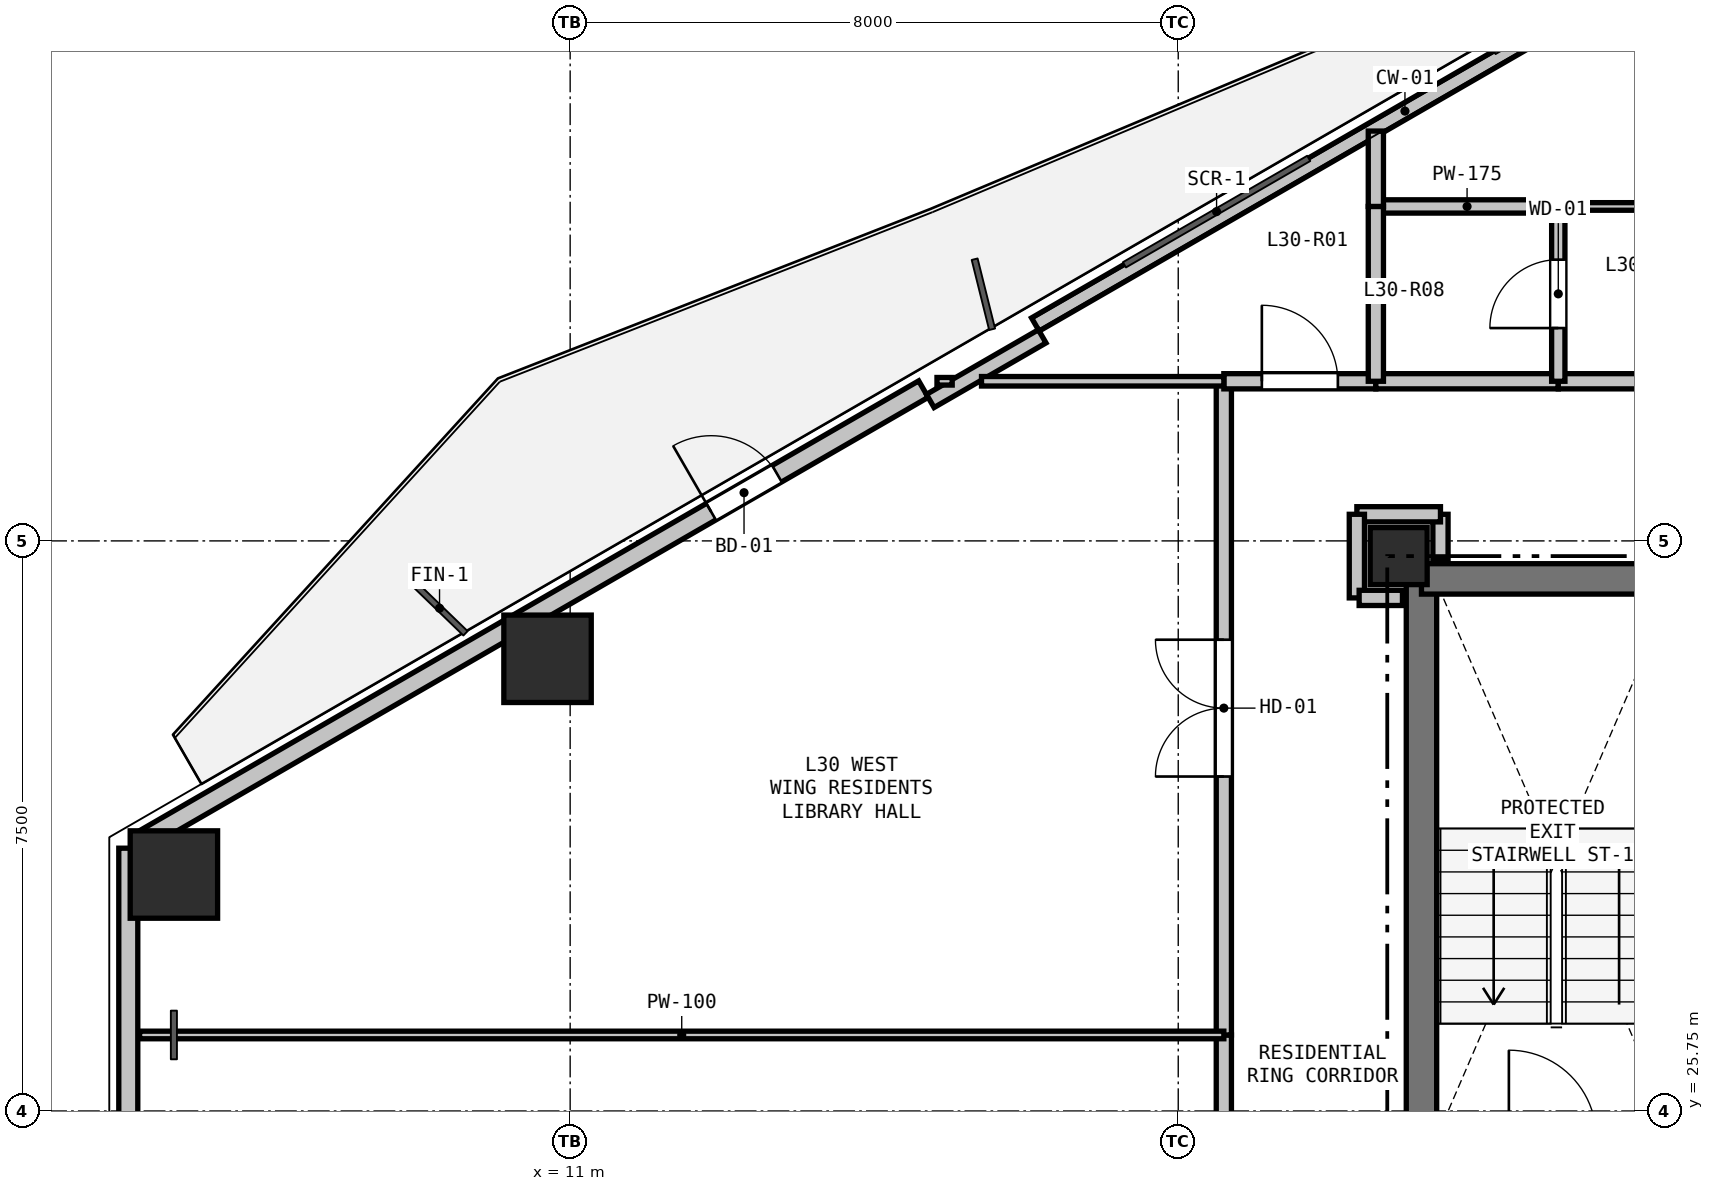
"""IFC4 building model, lengths in metres.
Left out: names, types, materials, properties, quantities, classifications, styles, units other than length and angle.
Written with IfcOpenShell. Run it as: python <this file> out.ifc"""

import sys

from ifc_helpers import new_model, si_unit, direction, frame, frame_2d, origin, origin_2d, place, context, subcontext, project, spatial, rectangle, hollow_rectangle, extrude, element, fill, save


model = new_model("IFC4")
c1 = context("Model", 3, precision=1e-05, world=origin(), true_north=direction((0.0, 1.0)))
c2 = subcontext(c1, "Body", "Model", "MODEL_VIEW")
j1 = project(units=[si_unit("LENGTHUNIT", "METRE"), si_unit("PLANEANGLEUNIT", "RADIAN")], contexts=[c1])
p1 = place(None, origin())
s1 = spatial("IfcSite", under=j1, at=p1, CompositionType="ELEMENT")
p2 = place(p1, origin())
s2 = spatial("IfcBuilding", under=s1, at=p2, CompositionType="ELEMENT")
p3 = place(p2, frame((0.0, 0.0, 109.8)))
s3 = spatial("IfcBuildingStorey", under=s2, at=p3, CompositionType="ELEMENT", Elevation=109.8)
p4 = place(p3, frame((21.9, 33.05, 0.0), z_axis=(0.0, 0.0, 1.0), x_axis=(1.0, 0.0, 0.0)))
e1 = element("IfcColumn", 1, at=p4, inside=s3, PredefinedType="COLUMN", context=c2, shape_type="SweptSolid", body=[
    extrude(rectangle(XDim=0.75, YDim=0.75, at=origin_2d()), origin(), (0.0, 0.0, 1.0), 3.3),
])
for number, where, z_axis, x_axis in (
    (2, (5.787, 28.861, 0.0), (0.0, 0.0, 1.0), (1.0, 0.0, 0.0)),
    (3, (10.702, 31.699, 0.0), (0.0, 0.0, 1.0), (1.0, 0.0, 0.0)),
):
    element("IfcColumn", number, at=place(p3, frame(where, z_axis=z_axis, x_axis=x_axis)), inside=s3, PredefinedType="COLUMN", context=c2, shape_type="SweptSolid", body=[
        extrude(hollow_rectangle(XDim=1.15, YDim=1.15, WallThickness=0.032, at=origin_2d()), origin(), (0.0, 0.0, 1.0), 3.3),
    ])
p5 = place(p3, frame((5.187, 24.293, 0.0), z_axis=(0.0, 0.0, 1.0), x_axis=(0.0, 1.0, 0.0)))
e4 = element("IfcWall", 4, at=p5, inside=s3, PredefinedType="SOLIDWALL", context=c2, shape_type="SweptSolid", body=[
    extrude(rectangle(XDim=4.915, YDim=0.25, at=frame_2d((2.457, 0.0))), origin(), (0.0, 0.0, 1.0), 2.67),
])
p6 = place(p3, frame((5.317, 29.282, 0.0), z_axis=(0.0, 0.0, 1.0), x_axis=(0.866023023012, 0.500004123596, 0.0)))
e5 = element("IfcWall", 5, at=p6, inside=s3, PredefinedType="SOLIDWALL", context=c2, shape_type="SweptSolid", body=[
    extrude(rectangle(XDim=11.93, YDim=0.25, at=frame_2d((5.965, 0.0))), origin(), (0.0, 0.0, 1.0), 2.67),
])
p7 = place(p6, frame((8.704, 0.0, 0.0)))
e6 = element("IfcOpeningElement", 6, at=p7, cuts=e5, PredefinedType="OPENING", context=c2, shape_type="SweptSolid", body=[
    extrude(rectangle(XDim=1.0, YDim=2.1, at=frame_2d((0.5, 1.05))), frame((0.0, 0.135, 0.0), z_axis=(0.0, -1.0, 0.0), x_axis=(1.0, 0.0, 0.0)), (0.0, 0.0, 1.0), 0.27),
])
p8 = place(p3, frame((17.12, 36.097, 0.0), z_axis=(0.0, 0.0, 1.0), x_axis=(0.866027010039, 0.499997217876, 0.0)))
e7 = element("IfcWall", 7, at=p8, inside=s3, PredefinedType="PARAPET", context=c2, shape_type="SweptSolid", body=[
    extrude(rectangle(XDim=11.229, YDim=0.2, at=frame_2d((5.615, 0.0))), origin(), (0.0, 0.0, 1.0), 0.2),
])
p9 = place(p3, frame((15.738, 35.091, 0.0), z_axis=(0.0, 0.0, 1.0), x_axis=(0.866025371046, 0.500000056704, 0.0)))
e8 = element("IfcWall", 8, at=p9, inside=s3, PredefinedType="PARAPET", context=c2, shape_type="SweptSolid", body=[
    extrude(rectangle(XDim=1.7, YDim=0.2, at=frame_2d((0.85, 0.0))), origin(), (0.0, 0.0, 1.0), 2.67),
])
p10 = place(p3, frame((22.2, 25.4, 0.0), z_axis=(0.0, 0.0, 1.0), x_axis=(0.0, 1.0, 0.0)))
e9 = element("IfcWall", 9, at=p10, inside=s3, PredefinedType="SHEAR", context=c2, shape_type="SweptSolid", body=[
    extrude(rectangle(XDim=7.35, YDim=0.4, at=frame_2d((3.675, 0.0))), origin(), (0.0, 0.0, 1.0), 3.05),
])
p11 = place(p3, frame((22.2, 32.75, 0.0), z_axis=(0.0, 0.0, 1.0), x_axis=(1.0, 0.0, 0.0)))
e10 = element("IfcWall", 10, at=p11, inside=s3, PredefinedType="SHEAR", context=c2, shape_type="SweptSolid", body=[
    extrude(rectangle(XDim=3.45, YDim=0.4, at=frame_2d((1.725, 0.0))), origin(), (0.0, 0.0, 1.0), 3.05),
])
p12 = place(p3, frame((19.6, 18.15, 0.0), z_axis=(0.0, 0.0, 1.0), x_axis=(0.0, 1.0, 0.0)))
e11 = element("IfcWall", 11, at=p12, inside=s3, PredefinedType="PARTITIONING", context=c2, shape_type="SweptSolid", body=[
    extrude(rectangle(XDim=8.6, YDim=0.2, at=frame_2d((4.3, 0.0))), origin(), (0.0, 0.0, 1.0), 2.423),
])
p13 = place(p12, frame((3.8, 0.0, 0.0)))
e12 = element("IfcOpeningElement", 12, at=p13, cuts=e11, PredefinedType="OPENING", context=c2, shape_type="SweptSolid", body=[
    extrude(rectangle(XDim=1.0, YDim=2.15, at=frame_2d((0.5, 1.075))), frame((0.0, 0.11, 0.0), z_axis=(0.0, -1.0, 0.0), x_axis=(1.0, 0.0, 0.0)), (0.0, 0.0, 1.0), 0.22),
])
p14 = place(p3, frame((19.6, 26.75, 0.0), z_axis=(0.0, 0.0, 1.0), x_axis=(0.0, 1.0, 0.0)))
e13 = element("IfcWall", 13, at=p14, inside=s3, PredefinedType="PARTITIONING", context=c2, shape_type="SweptSolid", body=[
    extrude(rectangle(XDim=8.6, YDim=0.2, at=frame_2d((4.3, 0.0))), origin(), (0.0, 0.0, 1.0), 2.423),
])
p15 = place(p14, frame((3.4, 0.0, 0.0)))
e14 = element("IfcOpeningElement", 14, at=p15, cuts=e13, PredefinedType="OPENING", context=c2, shape_type="SweptSolid", body=[
    extrude(rectangle(XDim=1.8, YDim=2.2, at=frame_2d((0.9, 1.1))), frame((0.0, 0.11, 0.0), z_axis=(0.0, -1.0, 0.0), x_axis=(1.0, 0.0, 0.0)), (0.0, 0.0, 1.0), 0.22),
])
p16 = place(p3, frame((19.6, 35.35, 0.0), z_axis=(0.0, 0.0, 1.0), x_axis=(1.0, 0.0, 0.0)))
e15 = element("IfcWall", 15, at=p16, inside=s3, PredefinedType="PARTITIONING", context=c2, shape_type="SweptSolid", body=[
    extrude(rectangle(XDim=2.0, YDim=0.2, at=frame_2d((1.0, 0.0))), origin(), (0.0, 0.0, 1.0), 3.05),
])
p17 = place(p16, frame((0.5, 0.0, 0.0)))
e16 = element("IfcOpeningElement", 16, at=p17, cuts=e15, PredefinedType="OPENING", context=c2, shape_type="SweptSolid", body=[
    extrude(rectangle(XDim=1.0, YDim=2.15, at=frame_2d((0.5, 1.075))), frame((0.0, 0.11, 0.0), z_axis=(0.0, -1.0, 0.0), x_axis=(1.0, 0.0, 0.0)), (0.0, 0.0, 1.0), 0.22),
])
p18 = place(p3, frame((21.6, 35.35, 0.0), z_axis=(0.0, 0.0, 1.0), x_axis=(1.0, 0.0, 0.0)))
e17 = element("IfcWall", 17, at=p18, inside=s3, PredefinedType="PARTITIONING", context=c2, shape_type="SweptSolid", body=[
    extrude(rectangle(XDim=2.4, YDim=0.2, at=frame_2d((1.2, 0.0))), origin(), (0.0, 0.0, 1.0), 3.05),
])
p19 = place(p3, frame((24.0, 35.35, 0.0), z_axis=(0.0, 0.0, 1.0), x_axis=(1.0, 0.0, 0.0)))
e18 = element("IfcWall", 18, at=p19, inside=s3, PredefinedType="PARTITIONING", context=c2, shape_type="SweptSolid", body=[
    extrude(rectangle(XDim=3.2, YDim=0.2, at=frame_2d((1.6, 0.0))), origin(), (0.0, 0.0, 1.0), 3.05),
])
p20 = place(p19, frame((1.1, 0.0, 0.0)))
e19 = element("IfcOpeningElement", 19, at=p20, cuts=e18, PredefinedType="OPENING", context=c2, shape_type="SweptSolid", body=[
    extrude(rectangle(XDim=1.0, YDim=2.15, at=frame_2d((0.5, 1.075))), frame((0.0, 0.11, 0.0), z_axis=(0.0, -1.0, 0.0), x_axis=(1.0, 0.0, 0.0)), (0.0, 0.0, 1.0), 0.22),
])
p21 = place(p3, frame((22.45, 33.0, 0.0), z_axis=(0.0, 0.0, 1.0), x_axis=(0.0, 1.0, 0.0)))
e20 = element("IfcWall", 20, at=p21, inside=s3, PredefinedType="PARTITIONING", context=c2, shape_type="SweptSolid", body=[
    extrude(rectangle(XDim=0.6, YDim=0.2, at=frame_2d((0.3, 0.0))), origin(), (0.0, 0.0, 1.0), 2.498),
])
p22 = place(p3, frame((22.45, 33.6, 0.0), z_axis=(0.0, 0.0, 1.0), x_axis=(-1.0, 0.0, 0.0)))
e21 = element("IfcWall", 21, at=p22, inside=s3, PredefinedType="PARTITIONING", context=c2, shape_type="SweptSolid", body=[
    extrude(rectangle(XDim=1.1, YDim=0.2, at=frame_2d((0.55, 0.0))), origin(), (0.0, 0.0, 1.0), 3.05),
])
p23 = place(p3, frame((21.35, 33.6, 0.0), z_axis=(0.0, 0.0, 1.0), x_axis=(0.0, -1.0, 0.0)))
e22 = element("IfcWall", 22, at=p23, inside=s3, PredefinedType="PARTITIONING", context=c2, shape_type="SweptSolid", body=[
    extrude(rectangle(XDim=1.1, YDim=0.2, at=frame_2d((0.55, 0.0))), origin(), (0.0, 0.0, 1.0), 2.423),
])
p24 = place(p3, frame((21.38, 32.5, 0.0), z_axis=(0.0, 0.0, 1.0), x_axis=(1.0, 0.0, 0.0)))
e23 = element("IfcWall", 23, at=p24, inside=s3, PredefinedType="PARTITIONING", context=c2, shape_type="SweptSolid", body=[
    extrude(rectangle(XDim=0.57, YDim=0.2, at=frame_2d((0.285, 0.0))), origin(), (0.0, 0.0, 1.0), 2.498),
])
p25 = place(p3, frame((24.0, 37.65, 0.0), z_axis=(0.0, 0.0, 1.0), x_axis=(1.0, 0.0, 0.0)))
e24 = element("IfcWall", 24, at=p25, inside=s3, PredefinedType="PARTITIONING", context=c2, shape_type="SweptSolid", body=[
    extrude(rectangle(XDim=3.2, YDim=0.1, at=frame_2d((1.6, 0.0))), origin(), (0.0, 0.0, 1.0), 3.05),
])
p26 = place(p25, frame((1.125, 0.0, 0.0)))
e25 = element("IfcOpeningElement", 25, at=p26, cuts=e24, PredefinedType="OPENING", context=c2, shape_type="SweptSolid", body=[
    extrude(rectangle(XDim=0.95, YDim=2.1, at=frame_2d((0.475, 1.05))), frame((0.0, 0.06, 0.0), z_axis=(0.0, -1.0, 0.0), x_axis=(1.0, 0.0, 0.0)), (0.0, 0.0, 1.0), 0.12),
])
p27 = place(p3, frame((24.0, 35.35, 0.0), z_axis=(0.0, 0.0, 1.0), x_axis=(0.0, 1.0, 0.0)))
e26 = element("IfcWall", 26, at=p27, inside=s3, PredefinedType="PLUMBINGWALL", context=c2, shape_type="SweptSolid", body=[
    extrude(rectangle(XDim=2.3, YDim=0.175, at=frame_2d((1.15, 0.0))), origin(), (0.0, 0.0, 1.0), 3.05),
])
p28 = place(p27, frame((0.7, 0.0, 0.0)))
e27 = element("IfcOpeningElement", 27, at=p28, cuts=e26, PredefinedType="OPENING", context=c2, shape_type="SweptSolid", body=[
    extrude(rectangle(XDim=0.9, YDim=2.1, at=frame_2d((0.45, 1.05))), frame((0.0, 0.097, 0.0), z_axis=(0.0, -1.0, 0.0), x_axis=(1.0, 0.0, 0.0)), (0.0, 0.0, 1.0), 0.195),
])
p29 = place(p3, frame((21.6, 37.65, 0.0), z_axis=(0.0, 0.0, 1.0), x_axis=(1.0, 0.0, 0.0)))
e28 = element("IfcWall", 28, at=p29, inside=s3, PredefinedType="PLUMBINGWALL", context=c2, shape_type="SweptSolid", body=[
    extrude(rectangle(XDim=2.4, YDim=0.175, at=frame_2d((1.2, 0.0))), origin(), (0.0, 0.0, 1.0), 3.05),
])
p30 = place(p3, frame((21.6, 35.35, 0.0), z_axis=(0.0, 0.0, 1.0), x_axis=(0.0, 1.0, 0.0)))
e29 = element("IfcWall", 29, at=p30, inside=s3, PredefinedType="PARTITIONING", context=c2, shape_type="SweptSolid", body=[
    extrude(rectangle(XDim=2.3, YDim=0.2, at=frame_2d((1.15, 0.0))), origin(), (0.0, 0.0, 1.0), 3.05),
])
p31 = place(p3, frame((21.6, 38.642, 0.0), z_axis=(0.0, 0.0, 1.0), x_axis=(0.0, -1.0, 0.0)))
e30 = element("IfcWall", 30, at=p31, inside=s3, PredefinedType="PARTITIONING", context=c2, shape_type="SweptSolid", body=[
    extrude(rectangle(XDim=0.992, YDim=0.2, at=frame_2d((0.496, 0.0))), origin(), (0.0, 0.0, 1.0), 2.365),
])
p32 = place(p3, frame((19.6, 35.35, 0.0), z_axis=(0.0, 0.0, 1.0), x_axis=(-1.0, 0.0, 0.0)))
e31 = element("IfcWall", 31, at=p32, inside=s3, PredefinedType="PARTITIONING", context=c2, shape_type="SweptSolid", body=[
    extrude(rectangle(XDim=3.188, YDim=0.125, at=frame_2d((1.594, 0.0))), origin(), (0.0, 0.0, 1.0), 2.365),
])
p33 = place(p3, frame((16.026, 35.35, 0.0), z_axis=(0.0, 0.0, 1.0), x_axis=(-1.0, 0.0, 0.0)))
e32 = element("IfcWall", 32, at=p33, inside=s3, PredefinedType="PARTITIONING", context=c2, shape_type="SweptSolid", body=[
    extrude(rectangle(XDim=0.2, YDim=0.1, at=frame_2d((0.1, 0.0))), origin(), (0.0, 0.0, 1.0), 3.05),
])
p34 = place(p3, frame((5.336, 26.75, 0.0), z_axis=(0.0, 0.0, 1.0), x_axis=(1.0, 0.0, 0.0)))
e33 = element("IfcWall", 33, at=p34, inside=s3, PredefinedType="PARTITIONING", context=c2, shape_type="SweptSolid", body=[
    extrude(rectangle(XDim=14.264, YDim=0.1, at=frame_2d((7.132, 0.0))), origin(), (0.0, 0.0, 1.0), 2.714),
])
p35 = place(p7, origin())
e34 = element("IfcDoor", 34, at=p35, inside=s3, OperationType="SINGLE_SWING_LEFT", PredefinedType="DOOR", context=c2, shape_type="SweptSolid", body=[
    extrude(rectangle(XDim=1.0, YDim=2.1, at=frame_2d((0.5, 1.05))), frame((0.0, 0.025, 0.0), z_axis=(0.0, -1.0, 0.0), x_axis=(1.0, 0.0, 0.0)), (0.0, 0.0, 1.0), 0.05),
])
fill(e6, e34)
p36 = place(p17, origin())
e35 = element("IfcDoor", 35, at=p36, inside=s3, OperationType="SINGLE_SWING_LEFT", PredefinedType="DOOR", context=c2, shape_type="SweptSolid", body=[
    extrude(rectangle(XDim=1.0, YDim=2.15, at=frame_2d((0.5, 1.075))), frame((0.0, 0.025, 0.0), z_axis=(0.0, -1.0, 0.0), x_axis=(1.0, 0.0, 0.0)), (0.0, 0.0, 1.0), 0.05),
])
fill(e16, e35)
p37 = place(p15, origin())
e36 = element("IfcDoor", 36, at=p37, inside=s3, OperationType="DOUBLE_DOOR_SINGLE_SWING", PredefinedType="DOOR", context=c2, shape_type="SweptSolid", body=[
    extrude(rectangle(XDim=1.8, YDim=2.2, at=frame_2d((0.9, 1.1))), frame((0.0, 0.025, 0.0), z_axis=(0.0, -1.0, 0.0), x_axis=(1.0, 0.0, 0.0)), (0.0, 0.0, 1.0), 0.05),
])
fill(e14, e36)
p38 = place(p28, origin())
e37 = element("IfcDoor", 37, at=p38, inside=s3, OperationType="SINGLE_SWING_LEFT", PredefinedType="DOOR", context=c2, shape_type="SweptSolid", body=[
    extrude(rectangle(XDim=0.9, YDim=2.1, at=frame_2d((0.45, 1.05))), frame((0.0, 0.025, 0.0), z_axis=(0.0, -1.0, 0.0), x_axis=(1.0, 0.0, 0.0)), (0.0, 0.0, 1.0), 0.05),
])
fill(e27, e37)
save(model, sys.argv[1])
